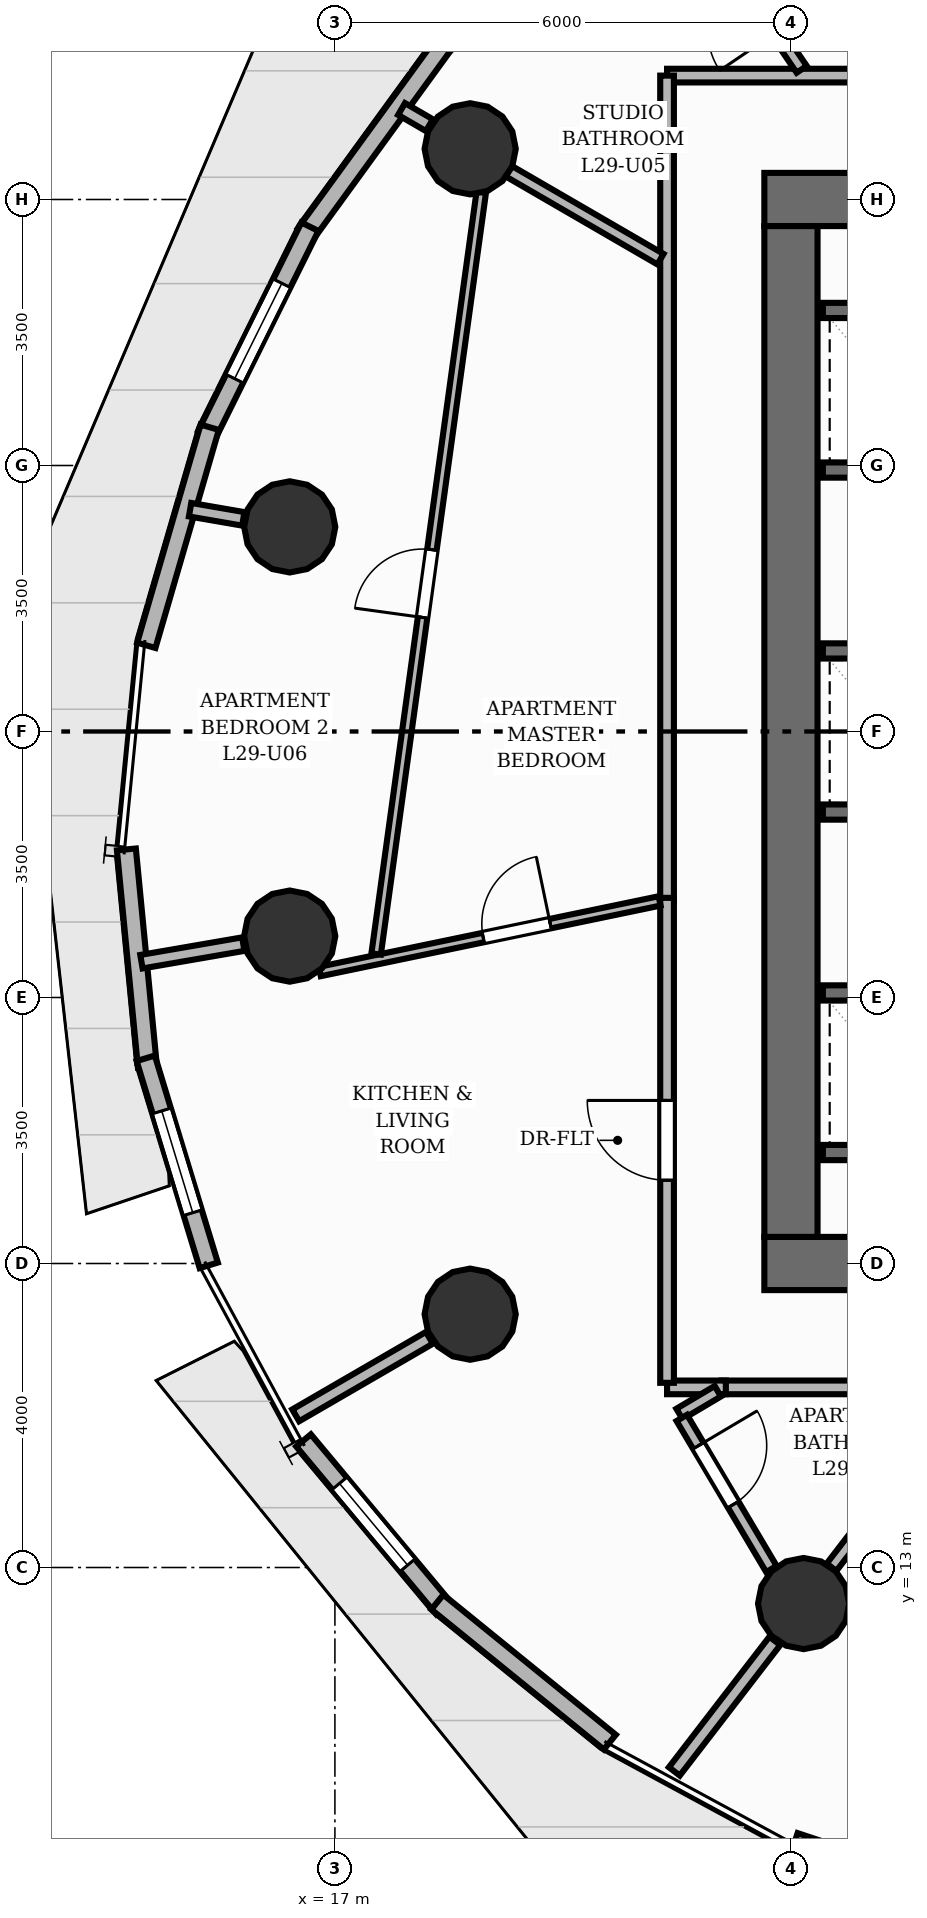
"""IFC4 building model, lengths in metres.
Left out: names, types, materials, properties, quantities, classifications, styles, units other than length and angle.
Written with IfcOpenShell. Run it as: python <this file> out.ifc"""

import sys

from ifc_helpers import new_model, si_unit, direction, frame, frame_2d, origin, origin_2d, place, context, subcontext, project, spatial, rectangle, circle, extrude, element, fill, save


model = new_model("IFC4")
c1 = context("Model", 3, precision=1e-05, world=origin(), true_north=direction((0.0, 1.0)))
c2 = subcontext(c1, "Body", "Model", "MODEL_VIEW")
j1 = project(units=[si_unit("LENGTHUNIT", "METRE"), si_unit("PLANEANGLEUNIT", "RADIAN")], contexts=[c1])
p1 = place(None, origin())
s1 = spatial("IfcSite", under=j1, at=p1, CompositionType="ELEMENT")
p2 = place(p1, origin())
s2 = spatial("IfcBuilding", under=s1, at=p2, CompositionType="ELEMENT")
p3 = place(p2, frame((0.0, 0.0, 99.68)))
s3 = spatial("IfcBuildingStorey", under=s2, at=p3, CompositionType="ELEMENT", Elevation=99.68)
p4 = place(p3, frame((22.65, 17.0, 0.0), z_axis=(0.0, 0.0, 1.0), x_axis=(1.0, 0.0, 0.0)))
e1 = element("IfcWall", 1, at=p4, inside=s3, PredefinedType="SHEAR", context=c2, shape_type="SweptSolid", body=[
    extrude(rectangle(XDim=18.7, YDim=0.7, at=frame_2d((9.35, 0.0))), origin(), (0.0, 0.0, 1.0), 3.2),
])
p5 = place(p4, frame((5.85, 0.0, 0.0)))
e2 = element("IfcOpeningElement", 2, at=p5, cuts=e1, PredefinedType="OPENING", context=c2, shape_type="SweptSolid", body=[
    extrude(rectangle(XDim=1.1, YDim=2.15, at=frame_2d((0.55, 1.075))), frame((0.0, 0.36, 0.0), z_axis=(0.0, -1.0, 0.0), x_axis=(1.0, 0.0, 0.0)), (0.0, 0.0, 1.0), 0.72),
])
p6 = place(p4, frame((9.4, 0.0, 0.0)))
e3 = element("IfcOpeningElement", 3, at=p6, cuts=e1, PredefinedType="OPENING", context=c2, shape_type="SweptSolid", body=[
    extrude(rectangle(XDim=0.9, YDim=2.1, at=frame_2d((0.45, 1.05))), frame((0.0, 0.36, 0.0), z_axis=(0.0, -1.0, 0.0), x_axis=(1.0, 0.0, 0.0)), (0.0, 0.0, 1.0), 0.72),
])
p7 = place(p3, frame((22.65, 31.0, 0.0), z_axis=(0.0, 0.0, 1.0), x_axis=(1.0, 0.0, 0.0)))
e4 = element("IfcWall", 4, at=p7, inside=s3, PredefinedType="SHEAR", context=c2, shape_type="SweptSolid", body=[
    extrude(rectangle(XDim=18.7, YDim=0.7, at=frame_2d((9.35, 0.0))), origin(), (0.0, 0.0, 1.0), 3.2),
])
p8 = place(p7, frame((11.75, 0.0, 0.0)))
e5 = element("IfcOpeningElement", 5, at=p8, cuts=e4, PredefinedType="OPENING", context=c2, shape_type="SweptSolid", body=[
    extrude(rectangle(XDim=1.1, YDim=2.15, at=frame_2d((0.55, 1.075))), frame((0.0, 0.36, 0.0), z_axis=(0.0, -1.0, 0.0), x_axis=(1.0, 0.0, 0.0)), (0.0, 0.0, 1.0), 0.72),
])
p9 = place(p3, frame((23.0, 17.35, 0.0), z_axis=(0.0, 0.0, 1.0), x_axis=(0.0, 1.0, 0.0)))
e6 = element("IfcWall", 6, at=p9, inside=s3, PredefinedType="SHEAR", context=c2, shape_type="SweptSolid", body=[
    extrude(rectangle(XDim=13.3, YDim=0.7, at=frame_2d((6.65, 0.0))), origin(), (0.0, 0.0, 1.0), 3.2),
])
for number, where, z_axis, x_axis in (
    (7, (18.78, 31.667, 0.0), (0.0, 0.0, 1.0), (1.0, 0.0, 0.0)),
    (8, (16.406, 26.692, 0.0), (0.0, 0.0, 1.0), (1.0, 0.0, 0.0)),
    (9, (16.406, 21.308, 0.0), (0.0, 0.0, 1.0), (1.0, 0.0, 0.0)),
    (10, (18.78, 16.333, 0.0), (0.0, 0.0, 1.0), (1.0, 0.0, 0.0)),
    (11, (23.167, 12.526, 0.0), (0.0, 0.0, 1.0), (1.0, 0.0, 0.0)),
):
    element("IfcColumn", number, at=place(p3, frame(where, z_axis=z_axis, x_axis=x_axis)), inside=s3, PredefinedType="COLUMN", context=c2, shape_type="SweptSolid", body=[
        extrude(circle(Radius=0.6, at=origin_2d()), origin(), (0.0, 0.0, 1.0), 3.2),
    ])
p10 = place(p3, frame((18.384, 32.996, 0.0), z_axis=(0.0, 0.0, 1.0), x_axis=(0.710540573889, 0.703656232017, 0.0)))
e12 = element("IfcWall", 12, at=p10, inside=s3, PredefinedType="SOLIDWALL", context=c2, shape_type="SweptSolid", body=[
    extrude(rectangle(XDim=3.192, YDim=0.25, at=frame_2d((1.596, 0.0))), origin(), (0.0, 0.0, 1.0), 2.96),
])
p11 = place(p10, frame((0.771, 0.0, 0.85)))
e13 = element("IfcOpeningElement", 13, at=p11, cuts=e12, PredefinedType="OPENING", context=c2, shape_type="SweptSolid", body=[
    extrude(rectangle(XDim=1.65, YDim=1.55, at=frame_2d((0.825, 0.775))), frame((0.0, 0.135, 0.0), z_axis=(0.0, -1.0, 0.0), x_axis=(1.0, 0.0, 0.0)), (0.0, 0.0, 1.0), 0.27),
])
p12 = place(p3, frame((16.614, 30.547, 0.0), z_axis=(0.0, 0.0, 1.0), x_axis=(0.588208785685, 0.808709109905, 0.0)))
e14 = element("IfcWall", 14, at=p12, inside=s3, PredefinedType="SOLIDWALL", context=c2, shape_type="SweptSolid", body=[
    extrude(rectangle(XDim=3.131, YDim=0.25, at=frame_2d((1.565, 0.0))), origin(), (0.0, 0.0, 1.0), 2.96),
])
p13 = place(p3, frame((15.312, 27.899, 0.0), z_axis=(0.0, 0.0, 1.0), x_axis=(0.443988069997, 0.896032696781, 0.0)))
e15 = element("IfcWall", 15, at=p13, inside=s3, PredefinedType="SOLIDWALL", context=c2, shape_type="SweptSolid", body=[
    extrude(rectangle(XDim=3.061, YDim=0.25, at=frame_2d((1.53, 0.0))), origin(), (0.0, 0.0, 1.0), 2.96),
])
p14 = place(p13, frame((0.83, 0.0, 0.85)))
e16 = element("IfcOpeningElement", 16, at=p14, cuts=e15, PredefinedType="OPENING", context=c2, shape_type="SweptSolid", body=[
    extrude(rectangle(XDim=1.4, YDim=1.55, at=frame_2d((0.7, 0.775))), frame((0.0, 0.135, 0.0), z_axis=(0.0, -1.0, 0.0), x_axis=(1.0, 0.0, 0.0)), (0.0, 0.0, 1.0), 0.27),
])
p15 = place(p3, frame((14.519, 25.134, 0.0), z_axis=(0.0, 0.0, 1.0), x_axis=(0.279152874041, 0.960246672952, 0.0)))
e17 = element("IfcWall", 17, at=p15, inside=s3, PredefinedType="SOLIDWALL", context=c2, shape_type="SweptSolid", body=[
    extrude(rectangle(XDim=2.989, YDim=0.25, at=frame_2d((1.494, 0.0))), origin(), (0.0, 0.0, 1.0), 2.96),
])
p16 = place(p3, frame((14.533, 19.588, 0.0), z_axis=(0.0, 0.0, 1.0), x_axis=(-0.096332339466, 0.995349225334, 0.0)))
e18 = element("IfcWall", 18, at=p16, inside=s3, PredefinedType="SOLIDWALL", context=c2, shape_type="SweptSolid", body=[
    extrude(rectangle(XDim=2.874, YDim=0.25, at=frame_2d((1.437, 0.0))), origin(), (0.0, 0.0, 1.0), 2.96),
])
p17 = place(p3, frame((15.34, 16.976, 0.0), z_axis=(0.0, 0.0, 1.0), x_axis=(-0.291144558409, 0.956679071637, 0.0)))
e19 = element("IfcWall", 19, at=p17, inside=s3, PredefinedType="SOLIDWALL", context=c2, shape_type="SweptSolid", body=[
    extrude(rectangle(XDim=2.848, YDim=0.25, at=frame_2d((1.424, 0.0))), origin(), (0.0, 0.0, 1.0), 2.96),
])
p18 = place(p17, frame((0.724, 0.0, 0.85)))
e20 = element("IfcOpeningElement", 20, at=p18, cuts=e19, PredefinedType="OPENING", context=c2, shape_type="SweptSolid", body=[
    extrude(rectangle(XDim=1.4, YDim=1.55, at=frame_2d((0.7, 0.775))), frame((0.0, 0.135, 0.0), z_axis=(0.0, -1.0, 0.0), x_axis=(1.0, 0.0, 0.0)), (0.0, 0.0, 1.0), 0.27),
])
p19 = place(p3, frame((18.428, 12.465, 0.0), z_axis=(0.0, 0.0, 1.0), x_axis=(-0.640518566271, 0.76794268423, 0.0)))
e21 = element("IfcWall", 21, at=p19, inside=s3, PredefinedType="SOLIDWALL", context=c2, shape_type="SweptSolid", body=[
    extrude(rectangle(XDim=2.874, YDim=0.25, at=frame_2d((1.437, 0.0))), origin(), (0.0, 0.0, 1.0), 2.96),
])
p20 = place(p19, frame((0.737, 0.0, 0.85)))
e22 = element("IfcOpeningElement", 22, at=p20, cuts=e21, PredefinedType="OPENING", context=c2, shape_type="SweptSolid", body=[
    extrude(rectangle(XDim=1.4, YDim=1.55, at=frame_2d((0.7, 0.775))), frame((0.0, 0.135, 0.0), z_axis=(0.0, -1.0, 0.0), x_axis=(1.0, 0.0, 0.0)), (0.0, 0.0, 1.0), 0.27),
])
p21 = place(p3, frame((20.617, 10.702, 0.0), z_axis=(0.0, 0.0, 1.0), x_axis=(-0.776285131062, 0.630381943976, 0.0)))
e23 = element("IfcWall", 23, at=p21, inside=s3, PredefinedType="SOLIDWALL", context=c2, shape_type="SweptSolid", body=[
    extrude(rectangle(XDim=2.923, YDim=0.25, at=frame_2d((1.462, 0.0))), origin(), (0.0, 0.0, 1.0), 2.96),
])
p22 = place(p3, frame((25.955, 8.426, 0.0), z_axis=(0.0, 0.0, 1.0), x_axis=(-0.949533409058, 0.313665913166, 0.0)))
e24 = element("IfcWall", 24, at=p22, inside=s3, PredefinedType="SOLIDWALL", context=c2, shape_type="SweptSolid", body=[
    extrude(rectangle(XDim=3.061, YDim=0.25, at=frame_2d((1.53, 0.0))), origin(), (0.0, 0.0, 1.0), 2.96),
])
for number, where, z_axis, x_axis in (
    (25, (23.42, 18.46, 0.0), (0.0, 0.0, 1.0), (1.0, 0.0, 0.0)),
    (26, (23.42, 29.54, 0.0), (0.0, 0.0, 1.0), (1.0, 0.0, 0.0)),
    (27, (23.42, 20.56, 0.0), (0.0, 0.0, 1.0), (1.0, 0.0, 0.0)),
    (28, (23.42, 22.94, 0.0), (0.0, 0.0, 1.0), (1.0, 0.0, 0.0)),
    (29, (23.42, 25.06, 0.0), (0.0, 0.0, 1.0), (1.0, 0.0, 0.0)),
    (30, (23.42, 27.44, 0.0), (0.0, 0.0, 1.0), (1.0, 0.0, 0.0)),
):
    element("IfcWall", number, at=place(p3, frame(where, z_axis=z_axis, x_axis=x_axis)), inside=s3, PredefinedType="SHEAR", context=c2, shape_type="SweptSolid", body=[
        extrude(rectangle(XDim=1.71, YDim=0.2, at=frame_2d((0.855, 0.0))), origin(), (0.0, 0.0, 1.0), 3.2),
    ])
p23 = place(p3, frame((18.243, 31.978, 0.0), z_axis=(0.0, 0.0, 1.0), x_axis=(-0.864926134071, 0.501899175733, 0.0)))
e31 = element("IfcWall", 31, at=p23, inside=s3, PredefinedType="PARTITIONING", context=c2, shape_type="SweptSolid", body=[
    extrude(rectangle(XDim=0.424, YDim=0.18, at=frame_2d((0.212, 0.0))), origin(), (0.0, 0.0, 1.0), 2.261),
])
p24 = place(p3, frame((15.794, 26.798, 0.0), z_axis=(0.0, 0.0, 1.0), x_axis=(-0.985420399327, 0.17013711115, 0.0)))
e32 = element("IfcWall", 32, at=p24, inside=s3, PredefinedType="PARTITIONING", context=c2, shape_type="SweptSolid", body=[
    extrude(rectangle(XDim=0.71, YDim=0.18, at=frame_2d((0.355, 0.0))), origin(), (0.0, 0.0, 1.0), 2.261),
])
p25 = place(p3, frame((15.794, 21.202, 0.0), z_axis=(0.0, 0.0, 1.0), x_axis=(-0.98540615772, -0.170219576807, 0.0)))
e33 = element("IfcWall", 33, at=p25, inside=s3, PredefinedType="PARTITIONING", context=c2, shape_type="SweptSolid", body=[
    extrude(rectangle(XDim=1.36, YDim=0.18, at=frame_2d((0.68, 0.0))), origin(), (0.0, 0.0, 1.0), 2.261),
])
p26 = place(p3, frame((18.243, 16.022, 0.0), z_axis=(0.0, 0.0, 1.0), x_axis=(-0.865025978628, -0.501727073516, 0.0)))
e34 = element("IfcWall", 34, at=p26, inside=s3, PredefinedType="PARTITIONING", context=c2, shape_type="SweptSolid", body=[
    extrude(rectangle(XDim=2.033, YDim=0.18, at=frame_2d((1.017, 0.0))), origin(), (0.0, 0.0, 1.0), 2.261),
])
p27 = place(p3, frame((22.788, 12.034, 0.0), z_axis=(0.0, 0.0, 1.0), x_axis=(-0.610026423006, -0.792381071981, 0.0)))
e35 = element("IfcWall", 35, at=p27, inside=s3, PredefinedType="PARTITIONING", context=c2, shape_type="SweptSolid", body=[
    extrude(rectangle(XDim=2.167, YDim=0.18, at=frame_2d((1.084, 0.0))), origin(), (0.0, 0.0, 1.0), 2.261),
])
p28 = place(p3, frame((38.645, 15.37, 0.0), z_axis=(0.0, 0.0, 1.0), x_axis=(-1.0, 0.0, 0.0)))
e36 = element("IfcWall", 36, at=p28, inside=s3, PredefinedType="PARTITIONING", context=c2, shape_type="SweptSolid", body=[
    extrude(rectangle(XDim=16.557, YDim=0.18, at=frame_2d((8.278, 0.0))), origin(), (0.0, 0.0, 1.0), 2.955),
])
p29 = place(p28, frame((6.513, 0.0, 0.0)))
e37 = element("IfcOpeningElement", 37, at=p29, cuts=e36, PredefinedType="OPENING", context=c2, shape_type="SweptSolid", body=[
    extrude(rectangle(XDim=1.05, YDim=2.15, at=frame_2d((0.525, 1.075))), frame((0.0, 0.1, 0.0), z_axis=(0.0, -1.0, 0.0), x_axis=(1.0, 0.0, 0.0)), (0.0, 0.0, 1.0), 0.2),
])
p30 = place(p3, frame((21.37, 32.63, 0.0), z_axis=(0.0, 0.0, 1.0), x_axis=(1.0, 0.0, 0.0)))
e38 = element("IfcWall", 38, at=p30, inside=s3, PredefinedType="PARTITIONING", context=c2, shape_type="SweptSolid", body=[
    extrude(rectangle(XDim=12.686, YDim=0.18, at=frame_2d((6.343, 0.0))), origin(), (0.0, 0.0, 1.0), 2.955),
])
p31 = place(p30, frame((10.499, 0.0, 0.0)))
e39 = element("IfcOpeningElement", 39, at=p31, cuts=e38, PredefinedType="OPENING", context=c2, shape_type="SweptSolid", body=[
    extrude(rectangle(XDim=1.05, YDim=2.15, at=frame_2d((0.525, 1.075))), frame((0.0, 0.1, 0.0), z_axis=(0.0, -1.0, 0.0), x_axis=(1.0, 0.0, 0.0)), (0.0, 0.0, 1.0), 0.2),
])
p32 = place(p30, frame((4.713, 0.0, 0.0)))
e40 = element("IfcOpeningElement", 40, at=p32, cuts=e38, PredefinedType="OPENING", context=c2, shape_type="SweptSolid", body=[
    extrude(rectangle(XDim=1.05, YDim=2.15, at=frame_2d((0.525, 1.075))), frame((0.0, 0.1, 0.0), z_axis=(0.0, -1.0, 0.0), x_axis=(1.0, 0.0, 0.0)), (0.0, 0.0, 1.0), 0.2),
])
p33 = place(p3, frame((21.37, 21.771, 0.0), z_axis=(0.0, 0.0, 1.0), x_axis=(0.0, 1.0, 0.0)))
e41 = element("IfcWall", 41, at=p33, inside=s3, PredefinedType="PARTITIONING", context=c2, shape_type="SweptSolid", body=[
    extrude(rectangle(XDim=10.859, YDim=0.18, at=frame_2d((5.43, 0.0))), origin(), (0.0, 0.0, 1.0), 2.955),
])
p34 = place(p3, frame((22.144, 15.37, 0.0), z_axis=(0.0, 0.0, 1.0), x_axis=(-1.0, 0.0, 0.0)))
e42 = element("IfcWall", 42, at=p34, inside=s3, PredefinedType="PARTITIONING", context=c2, shape_type="SweptSolid", body=[
    extrude(rectangle(XDim=0.773, YDim=0.18, at=frame_2d((0.387, 0.0))), origin(), (0.0, 0.0, 1.0), 2.955),
])
p35 = place(p3, frame((21.37, 15.43, 0.0), z_axis=(0.0, 0.0, 1.0), x_axis=(0.0, 1.0, 0.0)))
e43 = element("IfcWall", 43, at=p35, inside=s3, PredefinedType="PARTITIONING", context=c2, shape_type="SweptSolid", body=[
    extrude(rectangle(XDim=6.381, YDim=0.18, at=frame_2d((3.19, 0.0))), origin(), (0.0, 0.0, 1.0), 2.955),
])
p36 = place(p35, frame((2.666, 0.0, 0.0)))
e44 = element("IfcOpeningElement", 44, at=p36, cuts=e43, PredefinedType="OPENING", context=c2, shape_type="SweptSolid", body=[
    extrude(rectangle(XDim=1.05, YDim=2.15, at=frame_2d((0.525, 1.075))), frame((0.0, 0.1, 0.0), z_axis=(0.0, -1.0, 0.0), x_axis=(1.0, 0.0, 0.0)), (0.0, 0.0, 1.0), 0.2),
])
p37 = place(p3, frame((23.534, 13.003, 0.0), z_axis=(0.0, 0.0, 1.0), x_axis=(0.610033601295, 0.792375545617, 0.0)))
e45 = element("IfcWall", 45, at=p37, inside=s3, PredefinedType="PLUMBINGWALL", context=c2, shape_type="SweptSolid", body=[
    extrude(rectangle(XDim=2.887, YDim=0.16, at=frame_2d((1.443, 0.0))), origin(), (0.0, 0.0, 1.0), 2.261),
])
p38 = place(p3, frame((23.142, 32.713, 0.0), z_axis=(0.0, 0.0, 1.0), x_axis=(-0.561921019334, 0.827190889717, 0.0)))
e46 = element("IfcWall", 46, at=p38, inside=s3, PredefinedType="PLUMBINGWALL", context=c2, shape_type="SweptSolid", body=[
    extrude(rectangle(XDim=3.485, YDim=0.16, at=frame_2d((1.743, 0.0))), origin(), (0.0, 0.0, 1.0), 2.641),
])
p39 = place(p38, frame((0.593, 0.0, 0.0)))
e47 = element("IfcOpeningElement", 47, at=p39, cuts=e46, PredefinedType="OPENING", context=c2, shape_type="SweptSolid", body=[
    extrude(rectangle(XDim=0.9, YDim=2.1, at=frame_2d((0.45, 1.05))), frame((0.0, 0.09, 0.0), z_axis=(0.0, -1.0, 0.0), x_axis=(1.0, 0.0, 0.0)), (0.0, 0.0, 1.0), 0.18),
])
p40 = place(p3, frame((21.283, 30.215, 0.0), z_axis=(0.0, 0.0, 1.0), x_axis=(-0.865054150745, 0.501678498921, 0.0)))
e48 = element("IfcWall", 48, at=p40, inside=s3, PredefinedType="PLUMBINGWALL", context=c2, shape_type="SweptSolid", body=[
    extrude(rectangle(XDim=2.307, YDim=0.16, at=frame_2d((1.154, 0.0))), origin(), (0.0, 0.0, 1.0), 2.261),
])
p41 = place(p3, frame((22.038, 15.319, 0.0), z_axis=(0.0, 0.0, 1.0), x_axis=(-0.860054653874, -0.510201913315, 0.0)))
e49 = element("IfcWall", 49, at=p41, inside=s3, PredefinedType="PLUMBINGWALL", context=c2, shape_type="SweptSolid", body=[
    extrude(rectangle(XDim=0.586, YDim=0.16, at=frame_2d((0.293, 0.0))), origin(), (0.0, 0.0, 1.0), 2.955),
])
p42 = place(p3, frame((21.564, 14.969, 0.0), z_axis=(0.0, 0.0, 1.0), x_axis=(0.51007742589, -0.860128490168, 0.0)))
e50 = element("IfcWall", 50, at=p42, inside=s3, PredefinedType="PLUMBINGWALL", context=c2, shape_type="SweptSolid", body=[
    extrude(rectangle(XDim=2.311, YDim=0.16, at=frame_2d((1.156, 0.0))), origin(), (0.0, 0.0, 1.0), 2.404),
])
p43 = place(p42, frame((0.426, 0.0, 0.0)))
e51 = element("IfcOpeningElement", 51, at=p43, cuts=e50, PredefinedType="OPENING", context=c2, shape_type="SweptSolid", body=[
    extrude(rectangle(XDim=0.9, YDim=2.1, at=frame_2d((0.45, 1.05))), frame((0.0, 0.09, 0.0), z_axis=(0.0, -1.0, 0.0), x_axis=(1.0, 0.0, 0.0)), (0.0, 0.0, 1.0), 0.18),
])
p44 = place(p3, frame((16.801, 20.842, 0.0), z_axis=(0.0, 0.0, 1.0), x_axis=(0.979089254375, 0.203431147977, 0.0)))
e52 = element("IfcWall", 52, at=p44, inside=s3, PredefinedType="PARTITIONING", context=c2, shape_type="SweptSolid", body=[
    extrude(rectangle(XDim=4.566, YDim=0.125, at=frame_2d((2.283, 0.0))), origin(), (0.0, 0.0, 1.0), 2.955),
])
p45 = place(p44, frame((2.196, 0.0, 0.0)))
e53 = element("IfcOpeningElement", 53, at=p45, cuts=e52, PredefinedType="OPENING", context=c2, shape_type="SweptSolid", body=[
    extrude(rectangle(XDim=0.9, YDim=2.1, at=frame_2d((0.45, 1.05))), frame((0.0, 0.073, 0.0), z_axis=(0.0, -1.0, 0.0), x_axis=(1.0, 0.0, 0.0)), (0.0, 0.0, 1.0), 0.145),
])
p46 = place(p3, frame((17.542, 21.073, 0.0), z_axis=(0.0, 0.0, 1.0), x_axis=(0.136714950607, 0.99061042912, 0.0)))
e54 = element("IfcWall", 54, at=p46, inside=s3, PredefinedType="PARTITIONING", context=c2, shape_type="SweptSolid", body=[
    extrude(rectangle(XDim=10.12, YDim=0.125, at=frame_2d((5.06, 0.0))), origin(), (0.0, 0.0, 1.0), 2.955),
])
p47 = place(p46, frame((4.47, 0.0, 0.0)))
e55 = element("IfcOpeningElement", 55, at=p47, cuts=e54, PredefinedType="OPENING", context=c2, shape_type="SweptSolid", body=[
    extrude(rectangle(XDim=0.9, YDim=2.1, at=frame_2d((0.45, 1.05))), frame((0.0, 0.073, 0.0), z_axis=(0.0, -1.0, 0.0), x_axis=(1.0, 0.0, 0.0)), (0.0, 0.0, 1.0), 0.145),
])
p48 = place(p14, origin())
e56 = element("IfcWindow", 56, at=p48, inside=s3, PartitioningType="SINGLE_PANEL", PredefinedType="WINDOW", context=c2, shape_type="SweptSolid", body=[
    extrude(rectangle(XDim=1.4, YDim=1.55, at=frame_2d((0.7, 0.775))), frame((0.0, 0.03, 0.0), z_axis=(0.0, -1.0, 0.0), x_axis=(1.0, 0.0, 0.0)), (0.0, 0.0, 1.0), 0.06),
])
fill(e16, e56)
p49 = place(p18, origin())
e57 = element("IfcWindow", 57, at=p49, inside=s3, PartitioningType="SINGLE_PANEL", PredefinedType="WINDOW", context=c2, shape_type="SweptSolid", body=[
    extrude(rectangle(XDim=1.4, YDim=1.55, at=frame_2d((0.7, 0.775))), frame((0.0, 0.03, 0.0), z_axis=(0.0, -1.0, 0.0), x_axis=(1.0, 0.0, 0.0)), (0.0, 0.0, 1.0), 0.06),
])
fill(e20, e57)
p50 = place(p20, origin())
e58 = element("IfcWindow", 58, at=p50, inside=s3, PartitioningType="SINGLE_PANEL", PredefinedType="WINDOW", context=c2, shape_type="SweptSolid", body=[
    extrude(rectangle(XDim=1.4, YDim=1.55, at=frame_2d((0.7, 0.775))), frame((0.0, 0.03, 0.0), z_axis=(0.0, -1.0, 0.0), x_axis=(1.0, 0.0, 0.0)), (0.0, 0.0, 1.0), 0.06),
])
fill(e22, e58)
p51 = place(p36, origin())
e59 = element("IfcDoor", 59, at=p51, inside=s3, OperationType="SINGLE_SWING_RIGHT", PredefinedType="DOOR", context=c2, shape_type="SweptSolid", body=[
    extrude(rectangle(XDim=1.05, YDim=2.15, at=frame_2d((0.525, 1.075))), frame((0.0, 0.025, 0.0), z_axis=(0.0, -1.0, 0.0), x_axis=(1.0, 0.0, 0.0)), (0.0, 0.0, 1.0), 0.05),
])
fill(e44, e59)
p52 = place(p43, origin())
e60 = element("IfcDoor", 60, at=p52, inside=s3, OperationType="SINGLE_SWING_LEFT", PredefinedType="DOOR", context=c2, shape_type="SweptSolid", body=[
    extrude(rectangle(XDim=0.9, YDim=2.1, at=frame_2d((0.45, 1.05))), frame((0.0, 0.025, 0.0), z_axis=(0.0, -1.0, 0.0), x_axis=(1.0, 0.0, 0.0)), (0.0, 0.0, 1.0), 0.05),
])
fill(e51, e60)
p53 = place(p45, origin())
e61 = element("IfcDoor", 61, at=p53, inside=s3, OperationType="SINGLE_SWING_RIGHT", PredefinedType="DOOR", context=c2, shape_type="SweptSolid", body=[
    extrude(rectangle(XDim=0.9, YDim=2.1, at=frame_2d((0.45, 1.05))), frame((0.0, 0.025, 0.0), z_axis=(0.0, -1.0, 0.0), x_axis=(1.0, 0.0, 0.0)), (0.0, 0.0, 1.0), 0.05),
])
fill(e53, e61)
p54 = place(p47, origin())
e62 = element("IfcDoor", 62, at=p54, inside=s3, OperationType="SINGLE_SWING_LEFT", PredefinedType="DOOR", context=c2, shape_type="SweptSolid", body=[
    extrude(rectangle(XDim=0.9, YDim=2.1, at=frame_2d((0.45, 1.05))), frame((0.0, 0.025, 0.0), z_axis=(0.0, -1.0, 0.0), x_axis=(1.0, 0.0, 0.0)), (0.0, 0.0, 1.0), 0.05),
])
fill(e55, e62)
save(model, sys.argv[1])
